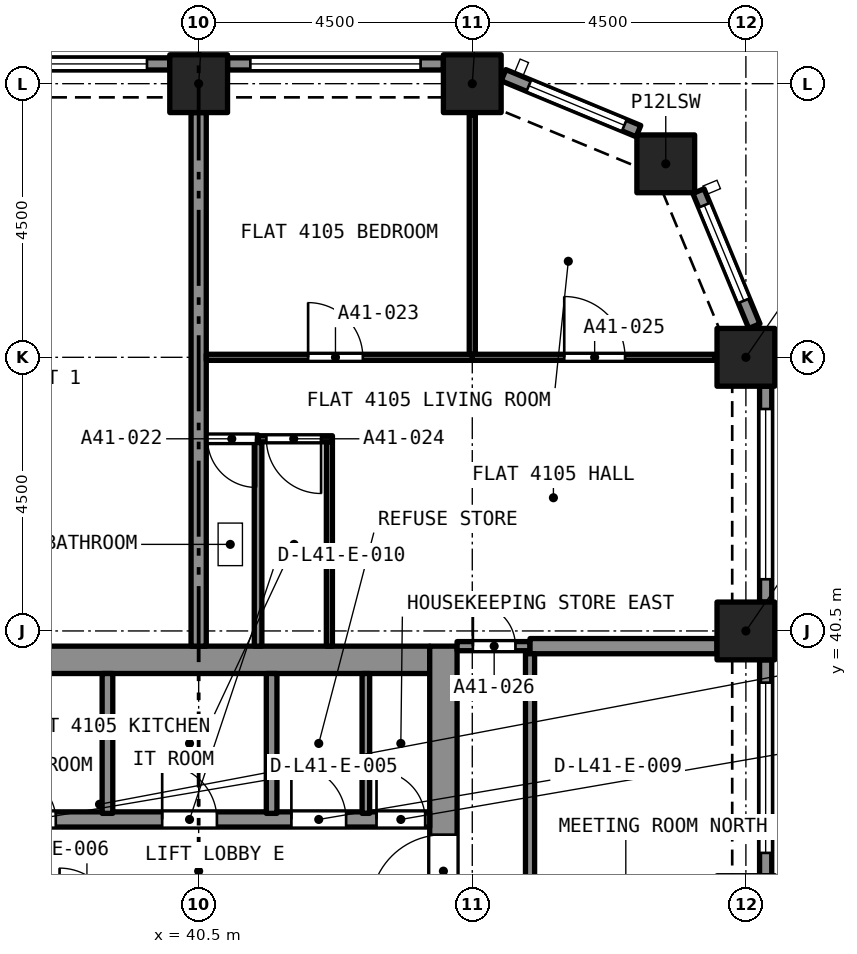
"""IFC4 building model, lengths in metres.
Left out: names, types, materials, properties, quantities, classifications, styles, units other than length and angle.
Written with IfcOpenShell. Run it as: python <this file> out.ifc"""

import sys

from ifc_helpers import new_model, si_unit, direction, frame, frame_2d, origin, origin_2d, place, context, subcontext, project, spatial, rectangle, extrude, element, fill, save


model = new_model("IFC4")
c1 = context("Model", 3, precision=1e-05, world=origin(), true_north=direction((0.0, 1.0)))
c2 = subcontext(c1, "Body", "Model", "MODEL_VIEW")
j1 = project(units=[si_unit("LENGTHUNIT", "METRE"), si_unit("PLANEANGLEUNIT", "RADIAN")], contexts=[c1])
p1 = place(None, origin())
s1 = spatial("IfcSite", under=j1, at=p1, CompositionType="ELEMENT")
p2 = place(p1, origin())
s2 = spatial("IfcBuilding", under=s1, at=p2, CompositionType="ELEMENT")
p3 = place(p2, frame((0.0, 0.0, 146.2)))
s3 = spatial("IfcBuildingStorey", under=s2, at=p3, CompositionType="ELEMENT", Elevation=146.2)
for number, where, z_axis, x_axis in (
    (1, (49.5, 40.5, 0.0), (0.0, 0.0, 1.0), (1.0, 0.0, 0.0)),
    (2, (49.5, 45.0, 0.0), (0.0, 0.0, 1.0), (1.0, 0.0, 0.0)),
    (3, (48.182, 48.182, 0.0), (0.0, 0.0, 1.0), (1.0, 0.0, 0.0)),
    (4, (40.5, 49.5, 0.0), (0.0, 0.0, 1.0), (1.0, 0.0, 0.0)),
    (5, (45.0, 49.5, 0.0), (0.0, 0.0, 1.0), (1.0, 0.0, 0.0)),
):
    element("IfcColumn", number, at=place(p3, frame(where, z_axis=z_axis, x_axis=x_axis)), inside=s3, PredefinedType="COLUMN", context=c2, shape_type="SweptSolid", body=[
        extrude(rectangle(XDim=0.95, YDim=0.95, at=origin_2d()), origin(), (0.0, 0.0, 1.0), 4.4),
    ])
p4 = place(p3, frame((36.7, 40.025, 0.0), z_axis=(0.0, 0.0, 1.0), x_axis=(1.0, 0.0, 0.0)))
e6 = element("IfcWall", 6, at=p4, inside=s3, PredefinedType="SOLIDWALL", context=c2, shape_type="SweptSolid", body=[
    extrude(rectangle(XDim=7.6, YDim=0.45, at=frame_2d((3.8, 0.0))), origin(), (0.0, 0.0, 1.0), 4.4),
])
p5 = place(p3, frame((44.525, 27.25, 0.0), z_axis=(0.0, 0.0, 1.0), x_axis=(0.0, 1.0, 0.0)))
e7 = element("IfcWall", 7, at=p5, inside=s3, PredefinedType="SOLIDWALL", context=c2, shape_type="SweptSolid", body=[
    extrude(rectangle(XDim=13.0, YDim=0.45, at=frame_2d((6.5, 0.0))), origin(), (0.0, 0.0, 1.0), 4.4),
])
p6 = place(p5, frame((8.7, 0.0, 0.0)))
e8 = element("IfcOpeningElement", 8, at=p6, cuts=e7, PredefinedType="OPENING", context=c2, shape_type="SweptSolid", body=[
    extrude(rectangle(XDim=1.2, YDim=2.1, at=frame_2d((0.6, 1.05))), frame((0.0, 0.235, 0.0), z_axis=(0.0, -1.0, 0.0), x_axis=(1.0, 0.0, 0.0)), (0.0, 0.0, 1.0), 0.47),
])
p7 = place(p3, frame((49.825, 40.025, 0.0), z_axis=(0.0, 0.0, 1.0), x_axis=(0.0, -1.0, 0.0)))
e9 = element("IfcWall", 9, at=p7, inside=s3, PredefinedType="SOLIDWALL", context=c2, shape_type="SweptSolid", body=[
    extrude(rectangle(XDim=3.55, YDim=0.2, at=frame_2d((1.775, 0.0))), origin(), (0.0, 0.0, 1.0), 4.4),
])
p8 = place(p7, frame((0.375, 0.0, 0.45)))
e10 = element("IfcOpeningElement", 10, at=p8, cuts=e9, PredefinedType="OPENING", context=c2, shape_type="SweptSolid", body=[
    extrude(rectangle(XDim=2.8, YDim=2.55, at=frame_2d((1.4, 1.275))), frame((0.0, 0.11, 0.0), z_axis=(0.0, -1.0, 0.0), x_axis=(1.0, 0.0, 0.0)), (0.0, 0.0, 1.0), 0.22),
])
p9 = place(p3, frame((49.825, 44.525, 0.0), z_axis=(0.0, 0.0, 1.0), x_axis=(0.0, -1.0, 0.0)))
e11 = element("IfcWall", 11, at=p9, inside=s3, PredefinedType="SOLIDWALL", context=c2, shape_type="SweptSolid", body=[
    extrude(rectangle(XDim=3.55, YDim=0.2, at=frame_2d((1.775, 0.0))), origin(), (0.0, 0.0, 1.0), 4.4),
])
p10 = place(p9, frame((0.375, 0.0, 0.45)))
e12 = element("IfcOpeningElement", 12, at=p10, cuts=e11, PredefinedType="OPENING", context=c2, shape_type="SweptSolid", body=[
    extrude(rectangle(XDim=2.8, YDim=2.55, at=frame_2d((1.4, 1.275))), frame((0.0, 0.11, 0.0), z_axis=(0.0, -1.0, 0.0), x_axis=(1.0, 0.0, 0.0)), (0.0, 0.0, 1.0), 0.22),
])
p11 = place(p3, frame((48.72, 47.733, 0.0), z_axis=(0.0, 0.0, 1.0), x_axis=(0.382680855588, -0.923880599843, 0.0)))
e13 = element("IfcWall", 13, at=p11, inside=s3, PredefinedType="SOLIDWALL", context=c2, shape_type="SweptSolid", body=[
    extrude(rectangle(XDim=2.403, YDim=0.2, at=frame_2d((1.201, 0.0))), origin(), (0.0, 0.0, 1.0), 4.4),
])
p12 = place(p11, frame((0.251, 0.0, 0.45)))
e14 = element("IfcOpeningElement", 14, at=p12, cuts=e13, PredefinedType="OPENING", context=c2, shape_type="SweptSolid", body=[
    extrude(rectangle(XDim=1.7, YDim=2.55, at=frame_2d((0.85, 1.275))), frame((0.0, 0.11, 0.0), z_axis=(0.0, -1.0, 0.0), x_axis=(1.0, 0.0, 0.0)), (0.0, 0.0, 1.0), 0.22),
])
p13 = place(p3, frame((45.513, 49.639, 0.0), z_axis=(0.0, 0.0, 1.0), x_axis=(0.923880599843, -0.382680855588, 0.0)))
e15 = element("IfcWall", 15, at=p13, inside=s3, PredefinedType="SOLIDWALL", context=c2, shape_type="SweptSolid", body=[
    extrude(rectangle(XDim=2.403, YDim=0.2, at=frame_2d((1.201, 0.0))), origin(), (0.0, 0.0, 1.0), 4.4),
])
p14 = place(p13, frame((0.451, 0.0, 0.45)))
e16 = element("IfcOpeningElement", 16, at=p14, cuts=e15, PredefinedType="OPENING", context=c2, shape_type="SweptSolid", body=[
    extrude(rectangle(XDim=1.7, YDim=2.55, at=frame_2d((0.85, 1.275))), frame((0.0, 0.11, 0.0), z_axis=(0.0, -1.0, 0.0), x_axis=(1.0, 0.0, 0.0)), (0.0, 0.0, 1.0), 0.22),
])
p15 = place(p3, frame((40.975, 49.825, 0.0), z_axis=(0.0, 0.0, 1.0), x_axis=(1.0, 0.0, 0.0)))
e17 = element("IfcWall", 17, at=p15, inside=s3, PredefinedType="SOLIDWALL", context=c2, shape_type="SweptSolid", body=[
    extrude(rectangle(XDim=3.55, YDim=0.2, at=frame_2d((1.775, 0.0))), origin(), (0.0, 0.0, 1.0), 4.4),
])
p16 = place(p15, frame((0.375, 0.0, 0.45)))
e18 = element("IfcOpeningElement", 18, at=p16, cuts=e17, PredefinedType="OPENING", context=c2, shape_type="SweptSolid", body=[
    extrude(rectangle(XDim=2.8, YDim=2.55, at=frame_2d((1.4, 1.275))), frame((0.0, 0.11, 0.0), z_axis=(0.0, -1.0, 0.0), x_axis=(1.0, 0.0, 0.0)), (0.0, 0.0, 1.0), 0.22),
])
p17 = place(p3, frame((36.475, 49.825, 0.0), z_axis=(0.0, 0.0, 1.0), x_axis=(1.0, 0.0, 0.0)))
e19 = element("IfcWall", 19, at=p17, inside=s3, PredefinedType="SOLIDWALL", context=c2, shape_type="SweptSolid", body=[
    extrude(rectangle(XDim=3.55, YDim=0.2, at=frame_2d((1.775, 0.0))), origin(), (0.0, 0.0, 1.0), 4.4),
])
p18 = place(p17, frame((0.375, 0.0, 0.45)))
e20 = element("IfcOpeningElement", 20, at=p18, cuts=e19, PredefinedType="OPENING", context=c2, shape_type="SweptSolid", body=[
    extrude(rectangle(XDim=2.8, YDim=2.55, at=frame_2d((1.4, 1.275))), frame((0.0, 0.11, 0.0), z_axis=(0.0, -1.0, 0.0), x_axis=(1.0, 0.0, 0.0)), (0.0, 0.0, 1.0), 0.22),
])
p19 = place(p3, frame((41.477, 43.66, 0.0), z_axis=(0.0, 0.0, 1.0), x_axis=(-1.0, 0.0, 0.0)))
e21 = element("IfcWall", 21, at=p19, inside=s3, PredefinedType="PARTITIONING", context=c2, shape_type="SweptSolid", body=[
    extrude(rectangle(XDim=0.852, YDim=0.125, at=frame_2d((0.426, 0.0))), origin(), (0.0, 0.0, 1.0), 4.1),
])
p20 = place(p19, frame((0.032, 0.0, 0.0)))
e22 = element("IfcOpeningElement", 22, at=p20, cuts=e21, PredefinedType="OPENING", context=c2, shape_type="SweptSolid", body=[
    extrude(rectangle(XDim=0.8, YDim=2.1, at=frame_2d((0.4, 1.05))), frame((0.0, 0.073, 0.0), z_axis=(0.0, -1.0, 0.0), x_axis=(1.0, 0.0, 0.0)), (0.0, 0.0, 1.0), 0.145),
])
p21 = place(p3, frame((41.477, 40.25, 0.0), z_axis=(0.0, 0.0, 1.0), x_axis=(0.0, 1.0, 0.0)))
e23 = element("IfcWall", 23, at=p21, inside=s3, PredefinedType="PARTITIONING", context=c2, shape_type="SweptSolid", body=[
    extrude(rectangle(XDim=3.347, YDim=0.125, at=frame_2d((1.674, 0.0))), origin(), (0.0, 0.0, 1.0), 4.1),
])
p22 = place(p3, frame((40.5, 40.25, 0.0), z_axis=(0.0, 0.0, 1.0), x_axis=(0.0, 1.0, 0.0)))
e24 = element("IfcWall", 24, at=p22, inside=s3, PredefinedType="PARTITIONING", context=c2, shape_type="SweptSolid", body=[
    extrude(rectangle(XDim=8.775, YDim=0.25, at=frame_2d((4.387, 0.0))), origin(), (0.0, 0.0, 1.0), 4.1),
])
p23 = place(p3, frame((40.625, 45.0, 0.0), z_axis=(0.0, 0.0, 1.0), x_axis=(1.0, 0.0, 0.0)))
e25 = element("IfcWall", 25, at=p23, inside=s3, PredefinedType="PARTITIONING", context=c2, shape_type="SweptSolid", body=[
    extrude(rectangle(XDim=4.375, YDim=0.1, at=frame_2d((2.188, 0.0))), origin(), (0.0, 0.0, 1.0), 4.1),
])
p24 = place(p23, frame((1.675, 0.0, 0.0)))
e26 = element("IfcOpeningElement", 26, at=p24, cuts=e25, PredefinedType="OPENING", context=c2, shape_type="SweptSolid", body=[
    extrude(rectangle(XDim=0.9, YDim=2.1, at=frame_2d((0.45, 1.05))), frame((0.0, 0.06, 0.0), z_axis=(0.0, -1.0, 0.0), x_axis=(1.0, 0.0, 0.0)), (0.0, 0.0, 1.0), 0.12),
])
p25 = place(p3, frame((45.0, 45.05, 0.0), z_axis=(0.0, 0.0, 1.0), x_axis=(0.0, 1.0, 0.0)))
e27 = element("IfcWall", 27, at=p25, inside=s3, PredefinedType="PARTITIONING", context=c2, shape_type="SweptSolid", body=[
    extrude(rectangle(XDim=3.936, YDim=0.1, at=frame_2d((1.968, 0.0))), origin(), (0.0, 0.0, 1.0), 4.1),
])
p26 = place(p3, frame((42.65, 40.25, 0.0), z_axis=(0.0, 0.0, 1.0), x_axis=(0.0, 1.0, 0.0)))
e28 = element("IfcWall", 28, at=p26, inside=s3, PredefinedType="PARTITIONING", context=c2, shape_type="SweptSolid", body=[
    extrude(rectangle(XDim=3.36, YDim=0.1, at=frame_2d((1.68, 0.0))), origin(), (0.0, 0.0, 1.0), 4.1),
])
p27 = place(p3, frame((42.7, 43.66, 0.0), z_axis=(0.0, 0.0, 1.0), x_axis=(-1.0, 0.0, 0.0)))
e29 = element("IfcWall", 29, at=p27, inside=s3, PredefinedType="PARTITIONING", context=c2, shape_type="SweptSolid", body=[
    extrude(rectangle(XDim=1.223, YDim=0.1, at=frame_2d((0.611, 0.0))), origin(), (0.0, 0.0, 1.0), 4.1),
])
p28 = place(p27, frame((0.186, 0.0, 0.0)))
e30 = element("IfcOpeningElement", 30, at=p28, cuts=e29, PredefinedType="OPENING", context=c2, shape_type="SweptSolid", body=[
    extrude(rectangle(XDim=0.9, YDim=2.1, at=frame_2d((0.45, 1.05))), frame((0.0, 0.06, 0.0), z_axis=(0.0, -1.0, 0.0), x_axis=(1.0, 0.0, 0.0)), (0.0, 0.0, 1.0), 0.12),
])
p29 = place(p3, frame((45.0, 45.0, 0.0), z_axis=(0.0, 0.0, 1.0), x_axis=(1.0, 0.0, 0.0)))
e31 = element("IfcWall", 31, at=p29, inside=s3, PredefinedType="PARTITIONING", context=c2, shape_type="SweptSolid", body=[
    extrude(rectangle(XDim=3.986, YDim=0.1, at=frame_2d((1.993, 0.0))), origin(), (0.0, 0.0, 1.0), 4.1),
])
p30 = place(p29, frame((1.512, 0.0, 0.0)))
e32 = element("IfcOpeningElement", 32, at=p30, cuts=e31, PredefinedType="OPENING", context=c2, shape_type="SweptSolid", body=[
    extrude(rectangle(XDim=1.0, YDim=2.1, at=frame_2d((0.5, 1.05))), frame((0.0, 0.06, 0.0), z_axis=(0.0, -1.0, 0.0), x_axis=(1.0, 0.0, 0.0)), (0.0, 0.0, 1.0), 0.12),
])
p31 = place(p3, frame((44.75, 40.25, 0.0), z_axis=(0.0, 0.0, 1.0), x_axis=(1.0, 0.0, 0.0)))
e33 = element("IfcWall", 33, at=p31, inside=s3, PredefinedType="PARTITIONING", context=c2, shape_type="SweptSolid", body=[
    extrude(rectangle(XDim=1.2, YDim=0.15, at=frame_2d((0.6, 0.0))), origin(), (0.0, 0.0, 1.0), 4.1),
])
p32 = place(p31, frame((0.26, 0.0, 0.0)))
e34 = element("IfcOpeningElement", 34, at=p32, cuts=e33, PredefinedType="OPENING", context=c2, shape_type="SweptSolid", body=[
    extrude(rectangle(XDim=0.7, YDim=2.1, at=frame_2d((0.35, 1.05))), frame((0.0, 0.085, 0.0), z_axis=(0.0, -1.0, 0.0), x_axis=(1.0, 0.0, 0.0)), (0.0, 0.0, 1.0), 0.17),
])
p33 = place(p3, frame((45.95, 40.25, 0.0), z_axis=(0.0, 0.0, 1.0), x_axis=(1.0, 0.0, 0.0)))
e35 = element("IfcWall", 35, at=p33, inside=s3, PredefinedType="PARTITIONING", context=c2, shape_type="SweptSolid", body=[
    extrude(rectangle(XDim=3.075, YDim=0.25, at=frame_2d((1.538, 0.0))), origin(), (0.0, 0.0, 1.0), 4.1),
])
p34 = place(p3, frame((45.95, 40.125, 0.0), z_axis=(0.0, 0.0, 1.0), x_axis=(0.0, -1.0, 0.0)))
e36 = element("IfcWall", 36, at=p34, inside=s3, PredefinedType="PARTITIONING", context=c2, shape_type="SweptSolid", body=[
    extrude(rectangle(XDim=8.625, YDim=0.15, at=frame_2d((4.312, 0.0))), origin(), (0.0, 0.0, 1.0), 4.1),
])
p35 = place(p34, frame((3.75, 0.0, 0.0)))
e37 = element("IfcOpeningElement", 37, at=p35, cuts=e36, PredefinedType="OPENING", context=c2, shape_type="SweptSolid", body=[
    extrude(rectangle(XDim=1.0, YDim=2.1, at=frame_2d((0.5, 1.05))), frame((0.0, 0.085, 0.0), z_axis=(0.0, -1.0, 0.0), x_axis=(1.0, 0.0, 0.0)), (0.0, 0.0, 1.0), 0.17),
])
p36 = place(p3, frame((36.7, 37.4, 0.0), z_axis=(0.0, 0.0, 1.0), x_axis=(1.0, 0.0, 0.0)))
e38 = element("IfcWall", 38, at=p36, inside=s3, PredefinedType="SOLIDWALL", context=c2, shape_type="SweptSolid", body=[
    extrude(rectangle(XDim=7.6, YDim=0.25, at=frame_2d((3.8, 0.0))), origin(), (0.0, 0.0, 1.0), 4.1),
])
p37 = place(p36, frame((0.75, 0.0, 0.0)))
e39 = element("IfcOpeningElement", 39, at=p37, cuts=e38, PredefinedType="OPENING", context=c2, shape_type="SweptSolid", body=[
    extrude(rectangle(XDim=0.7, YDim=2.1, at=frame_2d((0.35, 1.05))), frame((0.0, 0.135, 0.0), z_axis=(0.0, -1.0, 0.0), x_axis=(1.0, 0.0, 0.0)), (0.0, 0.0, 1.0), 0.27),
])
p38 = place(p36, frame((6.725, 0.0, 0.0)))
e40 = element("IfcOpeningElement", 40, at=p38, cuts=e38, PredefinedType="OPENING", context=c2, shape_type="SweptSolid", body=[
    extrude(rectangle(XDim=0.8, YDim=2.1, at=frame_2d((0.4, 1.05))), frame((0.0, 0.135, 0.0), z_axis=(0.0, -1.0, 0.0), x_axis=(1.0, 0.0, 0.0)), (0.0, 0.0, 1.0), 0.27),
])
p39 = place(p36, frame((5.325, 0.0, 0.0)))
e41 = element("IfcOpeningElement", 41, at=p39, cuts=e38, PredefinedType="OPENING", context=c2, shape_type="SweptSolid", body=[
    extrude(rectangle(XDim=0.9, YDim=2.1, at=frame_2d((0.45, 1.05))), frame((0.0, 0.135, 0.0), z_axis=(0.0, -1.0, 0.0), x_axis=(1.0, 0.0, 0.0)), (0.0, 0.0, 1.0), 0.27),
])
p40 = place(p36, frame((3.2, 0.0, 0.0)))
e42 = element("IfcOpeningElement", 42, at=p40, cuts=e38, PredefinedType="OPENING", context=c2, shape_type="SweptSolid", body=[
    extrude(rectangle(XDim=0.9, YDim=2.1, at=frame_2d((0.45, 1.05))), frame((0.0, 0.135, 0.0), z_axis=(0.0, -1.0, 0.0), x_axis=(1.0, 0.0, 0.0)), (0.0, 0.0, 1.0), 0.27),
])
for number, where, z_axis, x_axis in (
    (43, (41.7, 37.5, 0.0), (0.0, 0.0, 1.0), (0.0, 1.0, 0.0)),
    (44, (39.0, 37.5, 0.0), (0.0, 0.0, 1.0), (0.0, 1.0, 0.0)),
):
    element("IfcWall", number, at=place(p3, frame(where, z_axis=z_axis, x_axis=x_axis)), inside=s3, PredefinedType="SOLIDWALL", context=c2, shape_type="SweptSolid", body=[
        extrude(rectangle(XDim=2.3, YDim=0.175, at=frame_2d((1.15, 0.0))), origin(), (0.0, 0.0, 1.0), 4.1),
    ])
p41 = place(p3, frame((43.25, 37.5, 0.0), z_axis=(0.0, 0.0, 1.0), x_axis=(0.0, 1.0, 0.0)))
e45 = element("IfcWall", 45, at=p41, inside=s3, PredefinedType="PARTITIONING", context=c2, shape_type="SweptSolid", body=[
    extrude(rectangle(XDim=2.3, YDim=0.125, at=frame_2d((1.15, 0.0))), origin(), (0.0, 0.0, 1.0), 4.1),
])
p42 = place(p8, origin())
e46 = element("IfcWindow", 46, at=p42, inside=s3, PartitioningType="SINGLE_PANEL", PredefinedType="WINDOW", context=c2, shape_type="SweptSolid", body=[
    extrude(rectangle(XDim=2.8, YDim=2.55, at=frame_2d((1.4, 1.275))), frame((0.0, 0.03, 0.0), z_axis=(0.0, -1.0, 0.0), x_axis=(1.0, 0.0, 0.0)), (0.0, 0.0, 1.0), 0.06),
])
fill(e10, e46)
p43 = place(p10, origin())
e47 = element("IfcWindow", 47, at=p43, inside=s3, PartitioningType="SINGLE_PANEL", PredefinedType="WINDOW", context=c2, shape_type="SweptSolid", body=[
    extrude(rectangle(XDim=2.8, YDim=2.55, at=frame_2d((1.4, 1.275))), frame((0.0, 0.03, 0.0), z_axis=(0.0, -1.0, 0.0), x_axis=(1.0, 0.0, 0.0)), (0.0, 0.0, 1.0), 0.06),
])
fill(e12, e47)
p44 = place(p12, origin())
e48 = element("IfcWindow", 48, at=p44, inside=s3, PartitioningType="SINGLE_PANEL", PredefinedType="WINDOW", context=c2, shape_type="SweptSolid", body=[
    extrude(rectangle(XDim=1.7, YDim=2.55, at=frame_2d((0.85, 1.275))), frame((0.0, 0.03, 0.0), z_axis=(0.0, -1.0, 0.0), x_axis=(1.0, 0.0, 0.0)), (0.0, 0.0, 1.0), 0.06),
])
fill(e14, e48)
p45 = place(p14, origin())
e49 = element("IfcWindow", 49, at=p45, inside=s3, PartitioningType="SINGLE_PANEL", PredefinedType="WINDOW", context=c2, shape_type="SweptSolid", body=[
    extrude(rectangle(XDim=1.7, YDim=2.55, at=frame_2d((0.85, 1.275))), frame((0.0, 0.03, 0.0), z_axis=(0.0, -1.0, 0.0), x_axis=(1.0, 0.0, 0.0)), (0.0, 0.0, 1.0), 0.06),
])
fill(e16, e49)
p46 = place(p16, origin())
e50 = element("IfcWindow", 50, at=p46, inside=s3, PartitioningType="SINGLE_PANEL", PredefinedType="WINDOW", context=c2, shape_type="SweptSolid", body=[
    extrude(rectangle(XDim=2.8, YDim=2.55, at=frame_2d((1.4, 1.275))), frame((0.0, 0.03, 0.0), z_axis=(0.0, -1.0, 0.0), x_axis=(1.0, 0.0, 0.0)), (0.0, 0.0, 1.0), 0.06),
])
fill(e18, e50)
p47 = place(p18, origin())
e51 = element("IfcWindow", 51, at=p47, inside=s3, PartitioningType="SINGLE_PANEL", PredefinedType="WINDOW", context=c2, shape_type="SweptSolid", body=[
    extrude(rectangle(XDim=2.8, YDim=2.55, at=frame_2d((1.4, 1.275))), frame((0.0, 0.03, 0.0), z_axis=(0.0, -1.0, 0.0), x_axis=(1.0, 0.0, 0.0)), (0.0, 0.0, 1.0), 0.06),
])
fill(e20, e51)
p48 = place(p20, origin())
e52 = element("IfcDoor", 52, at=p48, inside=s3, OperationType="SINGLE_SWING_RIGHT", PredefinedType="DOOR", context=c2, shape_type="SweptSolid", body=[
    extrude(rectangle(XDim=0.8, YDim=2.1, at=frame_2d((0.4, 1.05))), frame((0.0, 0.025, 0.0), z_axis=(0.0, -1.0, 0.0), x_axis=(1.0, 0.0, 0.0)), (0.0, 0.0, 1.0), 0.05),
])
fill(e22, e52)
p49 = place(p24, origin())
e53 = element("IfcDoor", 53, at=p49, inside=s3, OperationType="SINGLE_SWING_LEFT", PredefinedType="DOOR", context=c2, shape_type="SweptSolid", body=[
    extrude(rectangle(XDim=0.9, YDim=2.1, at=frame_2d((0.45, 1.05))), frame((0.0, 0.025, 0.0), z_axis=(0.0, -1.0, 0.0), x_axis=(1.0, 0.0, 0.0)), (0.0, 0.0, 1.0), 0.05),
])
fill(e26, e53)
p50 = place(p28, origin())
e54 = element("IfcDoor", 54, at=p50, inside=s3, OperationType="SINGLE_SWING_RIGHT", PredefinedType="DOOR", context=c2, shape_type="SweptSolid", body=[
    extrude(rectangle(XDim=0.9, YDim=2.1, at=frame_2d((0.45, 1.05))), frame((0.0, 0.025, 0.0), z_axis=(0.0, -1.0, 0.0), x_axis=(1.0, 0.0, 0.0)), (0.0, 0.0, 1.0), 0.05),
])
fill(e30, e54)
p51 = place(p30, origin())
e55 = element("IfcDoor", 55, at=p51, inside=s3, OperationType="SINGLE_SWING_RIGHT", PredefinedType="DOOR", context=c2, shape_type="SweptSolid", body=[
    extrude(rectangle(XDim=1.0, YDim=2.1, at=frame_2d((0.5, 1.05))), frame((0.0, 0.025, 0.0), z_axis=(0.0, -1.0, 0.0), x_axis=(1.0, 0.0, 0.0)), (0.0, 0.0, 1.0), 0.05),
])
fill(e32, e55)
p52 = place(p32, origin())
e56 = element("IfcDoor", 56, at=p52, inside=s3, OperationType="SINGLE_SWING_RIGHT", PredefinedType="DOOR", context=c2, shape_type="SweptSolid", body=[
    extrude(rectangle(XDim=0.7, YDim=2.1, at=frame_2d((0.35, 1.05))), frame((0.0, 0.025, 0.0), z_axis=(0.0, -1.0, 0.0), x_axis=(1.0, 0.0, 0.0)), (0.0, 0.0, 1.0), 0.05),
])
fill(e34, e56)
p53 = place(p37, origin())
e57 = element("IfcDoor", 57, at=p53, inside=s3, OperationType="SINGLE_SWING_LEFT", PredefinedType="DOOR", context=c2, shape_type="SweptSolid", body=[
    extrude(rectangle(XDim=0.7, YDim=2.1, at=frame_2d((0.35, 1.05))), frame((0.0, 0.025, 0.0), z_axis=(0.0, -1.0, 0.0), x_axis=(1.0, 0.0, 0.0)), (0.0, 0.0, 1.0), 0.05),
])
fill(e39, e57)
p54 = place(p38, origin())
e58 = element("IfcDoor", 58, at=p54, inside=s3, OperationType="SINGLE_SWING_LEFT", PredefinedType="DOOR", context=c2, shape_type="SweptSolid", body=[
    extrude(rectangle(XDim=0.8, YDim=2.1, at=frame_2d((0.4, 1.05))), frame((0.0, 0.025, 0.0), z_axis=(0.0, -1.0, 0.0), x_axis=(1.0, 0.0, 0.0)), (0.0, 0.0, 1.0), 0.05),
])
fill(e40, e58)
p55 = place(p39, origin())
e59 = element("IfcDoor", 59, at=p55, inside=s3, OperationType="SINGLE_SWING_LEFT", PredefinedType="DOOR", context=c2, shape_type="SweptSolid", body=[
    extrude(rectangle(XDim=0.9, YDim=2.1, at=frame_2d((0.45, 1.05))), frame((0.0, 0.025, 0.0), z_axis=(0.0, -1.0, 0.0), x_axis=(1.0, 0.0, 0.0)), (0.0, 0.0, 1.0), 0.05),
])
fill(e41, e59)
p56 = place(p40, origin())
e60 = element("IfcDoor", 60, at=p56, inside=s3, OperationType="SINGLE_SWING_LEFT", PredefinedType="DOOR", context=c2, shape_type="SweptSolid", body=[
    extrude(rectangle(XDim=0.9, YDim=2.1, at=frame_2d((0.45, 1.05))), frame((0.0, 0.025, 0.0), z_axis=(0.0, -1.0, 0.0), x_axis=(1.0, 0.0, 0.0)), (0.0, 0.0, 1.0), 0.05),
])
fill(e42, e60)
p57 = place(p6, origin())
e61 = element("IfcDoor", 61, at=p57, inside=s3, OperationType="SINGLE_SWING_LEFT", PredefinedType="DOOR", context=c2, shape_type="SweptSolid", body=[
    extrude(rectangle(XDim=1.2, YDim=2.1, at=frame_2d((0.6, 1.05))), frame((0.0, 0.025, 0.0), z_axis=(0.0, -1.0, 0.0), x_axis=(1.0, 0.0, 0.0)), (0.0, 0.0, 1.0), 0.05),
])
fill(e8, e61)
save(model, sys.argv[1])
